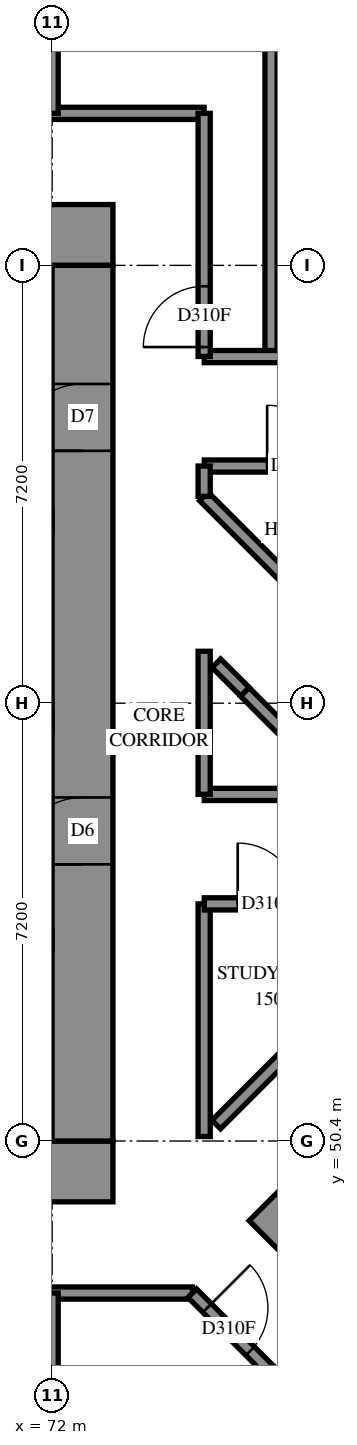
"""IFC4 building model, lengths in metres.
Left out: names, types, materials, properties, quantities, classifications, styles, units other than length and angle.
Written with IfcOpenShell. Run it as: python <this file> out.ifc"""

import sys

from ifc_helpers import new_model, si_unit, direction, frame, frame_2d, origin, place, context, subcontext, project, spatial, rectangle, extrude, element, fill, save


model = new_model("IFC4")
c1 = context("Model", 3, precision=1e-05, world=origin(), true_north=direction((0.0, 1.0)))
c2 = subcontext(c1, "Body", "Model", "MODEL_VIEW")
j1 = project(units=[si_unit("LENGTHUNIT", "METRE"), si_unit("PLANEANGLEUNIT", "RADIAN")], contexts=[c1])
p1 = place(None, origin())
s1 = spatial("IfcSite", under=j1, at=p1, CompositionType="ELEMENT")
p2 = place(p1, origin())
s2 = spatial("IfcBuilding", under=s1, at=p2, CompositionType="ELEMENT")
p3 = place(p2, frame((0.0, 0.0, 57.6)))
s3 = spatial("IfcBuildingStorey", under=s2, at=p3, CompositionType="ELEMENT", Elevation=57.6)
p4 = place(p3, frame((56.6, 49.9, -0.3), z_axis=(0.0, 0.0, 1.0), x_axis=(1.0, 0.0, 0.0)))
e1 = element("IfcWall", 1, at=p4, inside=s3, PredefinedType="SHEAR", context=c2, shape_type="SweptSolid", body=[
    extrude(rectangle(XDim=16.4, YDim=1.0, at=frame_2d((8.2, 0.0))), origin(), (0.0, 0.0, 1.0), 2.7),
])
p5 = place(p3, frame((56.6, 65.3, -0.3), z_axis=(0.0, 0.0, 1.0), x_axis=(1.0, 0.0, 0.0)))
e2 = element("IfcWall", 2, at=p5, inside=s3, PredefinedType="SHEAR", context=c2, shape_type="SweptSolid", body=[
    extrude(rectangle(XDim=16.4, YDim=1.0, at=frame_2d((8.2, 0.0))), origin(), (0.0, 0.0, 1.0), 2.7),
])
p6 = place(p5, frame((11.0, 0.0, 0.3)))
e3 = element("IfcOpeningElement", 3, at=p6, cuts=e2, PredefinedType="OPENING", context=c2, shape_type="SweptSolid", body=[
    extrude(rectangle(XDim=0.8, YDim=2.1, at=frame_2d((0.4, 1.05))), frame((0.0, 0.51, 0.0), z_axis=(0.0, -1.0, 0.0), x_axis=(1.0, 0.0, 0.0)), (0.0, 0.0, 1.0), 1.02),
])
p7 = place(p3, frame((72.5, 50.4, -0.3), z_axis=(0.0, 0.0, 1.0), x_axis=(0.0, 1.0, 0.0)))
e4 = element("IfcWall", 4, at=p7, inside=s3, PredefinedType="SHEAR", context=c2, shape_type="SweptSolid", body=[
    extrude(rectangle(XDim=14.4, YDim=1.0, at=frame_2d((7.2, 0.0))), origin(), (0.0, 0.0, 1.0), 2.7),
])
p8 = place(p7, frame((4.55, 0.0, 0.3)))
e5 = element("IfcOpeningElement", 5, at=p8, cuts=e4, PredefinedType="OPENING", context=c2, shape_type="SweptSolid", body=[
    extrude(rectangle(XDim=1.1, YDim=2.1, at=frame_2d((0.55, 1.05))), frame((0.0, 0.51, 0.0), z_axis=(0.0, -1.0, 0.0), x_axis=(1.0, 0.0, 0.0)), (0.0, 0.0, 1.0), 1.02),
])
p9 = place(p7, frame((11.35, 0.0, 0.3)))
e6 = element("IfcOpeningElement", 6, at=p9, cuts=e4, PredefinedType="OPENING", context=c2, shape_type="SweptSolid", body=[
    extrude(rectangle(XDim=1.1, YDim=2.1, at=frame_2d((0.55, 1.05))), frame((0.0, 0.51, 0.0), z_axis=(0.0, -1.0, 0.0), x_axis=(1.0, 0.0, 0.0)), (0.0, 0.0, 1.0), 1.02),
])
p10 = place(p3, frame((75.594, 49.443, -0.3), z_axis=(0.0, 0.0, 1.0), x_axis=(0.7071037324, -0.70710983, 0.0)))
e7 = element("IfcWall", 7, at=p10, inside=s3, PredefinedType="SHEAR", context=c2, shape_type="SweptSolid", body=[
    extrude(rectangle(XDim=16.4, YDim=1.0, at=frame_2d((8.2, 0.0))), origin(), (0.0, 0.0, 1.0), 2.7),
])
p11 = place(p3, frame((55.1, 67.3, 0.0), z_axis=(0.0, 0.0, 1.0), x_axis=(1.0, 0.0, 0.0)))
e8 = element("IfcWall", 8, at=p11, inside=s3, PredefinedType="PARTITIONING", context=c2, shape_type="SweptSolid", body=[
    extrude(rectangle(XDim=19.4, YDim=0.2, at=frame_2d((9.7, 0.0))), origin(), (0.0, 0.0, 1.0), 3.1),
])
p12 = place(p11, frame((6.361, 0.0, 0.0)))
e9 = element("IfcOpeningElement", 9, at=p12, cuts=e8, PredefinedType="OPENING", context=c2, shape_type="SweptSolid", body=[
    extrude(rectangle(XDim=0.9, YDim=2.1, at=frame_2d((0.45, 1.05))), frame((0.0, 0.11, 0.0), z_axis=(0.0, -1.0, 0.0), x_axis=(1.0, 0.0, 0.0)), (0.0, 0.0, 1.0), 0.22),
])
p13 = place(p11, frame((13.561, 0.0, 0.0)))
e10 = element("IfcOpeningElement", 10, at=p13, cuts=e8, PredefinedType="OPENING", context=c2, shape_type="SweptSolid", body=[
    extrude(rectangle(XDim=0.9, YDim=2.1, at=frame_2d((0.45, 1.05))), frame((0.0, 0.11, 0.0), z_axis=(0.0, -1.0, 0.0), x_axis=(1.0, 0.0, 0.0)), (0.0, 0.0, 1.0), 0.22),
])
p14 = place(p3, frame((55.1, 47.9, 0.0), z_axis=(0.0, 0.0, 1.0), x_axis=(1.0, 0.0, 0.0)))
e11 = element("IfcWall", 11, at=p14, inside=s3, PredefinedType="PARTITIONING", context=c2, shape_type="SweptSolid", body=[
    extrude(rectangle(XDim=19.208, YDim=0.2, at=frame_2d((9.604, 0.0))), origin(), (0.0, 0.0, 1.0), 3.1),
])
p15 = place(p14, frame((6.399, 0.0, 0.0)))
e12 = element("IfcOpeningElement", 12, at=p15, cuts=e11, PredefinedType="OPENING", context=c2, shape_type="SweptSolid", body=[
    extrude(rectangle(XDim=0.9, YDim=2.1, at=frame_2d((0.45, 1.05))), frame((0.0, 0.11, 0.0), z_axis=(0.0, -1.0, 0.0), x_axis=(1.0, 0.0, 0.0)), (0.0, 0.0, 1.0), 0.22),
])
p16 = place(p14, frame((13.561, 0.0, 0.0)))
e13 = element("IfcOpeningElement", 13, at=p16, cuts=e11, PredefinedType="OPENING", context=c2, shape_type="SweptSolid", body=[
    extrude(rectangle(XDim=0.9, YDim=2.1, at=frame_2d((0.45, 1.05))), frame((0.0, 0.11, 0.0), z_axis=(0.0, -1.0, 0.0), x_axis=(1.0, 0.0, 0.0)), (0.0, 0.0, 1.0), 0.22),
])
p17 = place(p3, frame((75.6, 63.3, 0.0), z_axis=(0.0, 0.0, 1.0), x_axis=(0.0, 1.0, 0.0)))
e14 = element("IfcWall", 14, at=p17, inside=s3, PredefinedType="PARTITIONING", context=c2, shape_type="SweptSolid", body=[
    extrude(rectangle(XDim=9.46, YDim=0.2, at=frame_2d((4.73, 0.0))), origin(), (0.0, 0.0, 1.0), 3.1),
])
p18 = place(p3, frame((74.699, 50.671, 0.0), z_axis=(0.0, 0.0, 1.0), x_axis=(0.7071067812, 0.7071067812, 0.0)))
e15 = element("IfcWall", 15, at=p18, inside=s3, PredefinedType="PARTITIONING", context=c2, shape_type="SweptSolid", body=[
    extrude(rectangle(XDim=5.131, YDim=0.2, at=frame_2d((2.565, 0.0))), origin(), (0.0, 0.0, 1.0), 3.1),
])
p19 = place(p3, frame((74.502, 63.3, 0.0), z_axis=(0.0, 0.0, 1.0), x_axis=(1.0, 0.0, 0.0)))
e16 = element("IfcWall", 16, at=p19, inside=s3, PredefinedType="PARTITIONING", context=c2, shape_type="SweptSolid", body=[
    extrude(rectangle(XDim=4.698, YDim=0.2, at=frame_2d((2.349, 0.0))), origin(), (0.0, 0.0, 1.0), 3.1),
])
p20 = place(p19, frame((1.963, 0.0, 0.0)))
e17 = element("IfcOpeningElement", 17, at=p20, cuts=e16, PredefinedType="OPENING", context=c2, shape_type="SweptSolid", body=[
    extrude(rectangle(XDim=1.0, YDim=2.1, at=frame_2d((0.5, 1.05))), frame((0.0, 0.11, 0.0), z_axis=(0.0, -1.0, 0.0), x_axis=(1.0, 0.0, 0.0)), (0.0, 0.0, 1.0), 0.22),
])
p21 = place(p3, frame((74.502, 61.5, 0.0), z_axis=(0.0, 0.0, 1.0), x_axis=(1.0, 0.0, 0.0)))
e18 = element("IfcWall", 18, at=p21, inside=s3, PredefinedType="PARTITIONING", context=c2, shape_type="SweptSolid", body=[
    extrude(rectangle(XDim=4.698, YDim=0.2, at=frame_2d((2.349, 0.0))), origin(), (0.0, 0.0, 1.0), 3.1),
])
p22 = place(p21, frame((1.034, 0.0, 0.0)))
e19 = element("IfcOpeningElement", 19, at=p22, cuts=e18, PredefinedType="OPENING", context=c2, shape_type="SweptSolid", body=[
    extrude(rectangle(XDim=1.0, YDim=2.1, at=frame_2d((0.5, 1.05))), frame((0.0, 0.11, 0.0), z_axis=(0.0, -1.0, 0.0), x_axis=(1.0, 0.0, 0.0)), (0.0, 0.0, 1.0), 0.22),
])
p23 = place(p3, frame((74.305, 47.897, 0.0), z_axis=(0.0, 0.0, 1.0), x_axis=(0.7071067812, -0.7071067812, 0.0)))
e20 = element("IfcWall", 20, at=p23, inside=s3, PredefinedType="PARTITIONING", context=c2, shape_type="SweptSolid", body=[
    extrude(rectangle(XDim=4.302, YDim=0.2, at=frame_2d((2.151, 0.0))), origin(), (0.0, 0.0, 1.0), 3.1),
])
p24 = place(p23, frame((0.345, 0.0, 0.0)))
e21 = element("IfcOpeningElement", 21, at=p24, cuts=e20, PredefinedType="OPENING", context=c2, shape_type="SweptSolid", body=[
    extrude(rectangle(XDim=1.0, YDim=2.1, at=frame_2d((0.5, 1.05))), frame((0.0, 0.11, 0.0), z_axis=(0.0, -1.0, 0.0), x_axis=(1.0, 0.0, 0.0)), (0.0, 0.0, 1.0), 0.22),
])
for number, where, z_axis, x_axis in (
    (22, (72.0, 67.3, 0.0), (0.0, 0.0, 1.0), (0.0, 1.0, 0.0)),
    (23, (72.0, 43.8, 0.0), (0.0, 0.0, 1.0), (0.0, 1.0, 0.0)),
):
    element("IfcWall", number, at=place(p3, frame(where, z_axis=z_axis, x_axis=x_axis)), inside=s3, PredefinedType="PARTITIONING", context=c2, shape_type="SweptSolid", body=[
        extrude(rectangle(XDim=4.1, YDim=0.2, at=frame_2d((2.05, 0.0))), origin(), (0.0, 0.0, 1.0), 3.1),
    ])
p25 = place(p3, frame((74.497, 60.999, 0.0), z_axis=(0.0, 0.0, 1.0), x_axis=(0.7071067812, -0.7071067812, 0.0)))
e24 = element("IfcWall", 24, at=p25, inside=s3, PredefinedType="PARTITIONING", context=c2, shape_type="SweptSolid", body=[
    extrude(rectangle(XDim=4.028, YDim=0.2, at=frame_2d((2.014, 0.0))), origin(), (0.0, 0.0, 1.0), 3.1),
])
p26 = place(p3, frame((74.5, 63.302, 0.0), z_axis=(0.0, 0.0, 1.0), x_axis=(0.0, 1.0, 0.0)))
e25 = element("IfcWall", 25, at=p26, inside=s3, PredefinedType="PARTITIONING", context=c2, shape_type="SweptSolid", body=[
    extrude(rectangle(XDim=3.998, YDim=0.2, at=frame_2d((1.999, 0.0))), origin(), (0.0, 0.0, 1.0), 3.1),
])
p27 = place(p26, frame((0.154, 0.0, 0.0)))
e26 = element("IfcOpeningElement", 26, at=p27, cuts=e25, PredefinedType="OPENING", context=c2, shape_type="SweptSolid", body=[
    extrude(rectangle(XDim=1.0, YDim=2.1, at=frame_2d((0.5, 1.05))), frame((0.0, 0.11, 0.0), z_axis=(0.0, -1.0, 0.0), x_axis=(1.0, 0.0, 0.0)), (0.0, 0.0, 1.0), 0.22),
])
p28 = place(p3, frame((74.5, 50.474, 0.0), z_axis=(0.0, 0.0, 1.0), x_axis=(0.0, 1.0, 0.0)))
e27 = element("IfcWall", 27, at=p28, inside=s3, PredefinedType="PARTITIONING", context=c2, shape_type="SweptSolid", body=[
    extrude(rectangle(XDim=3.826, YDim=0.2, at=frame_2d((1.913, 0.0))), origin(), (0.0, 0.0, 1.0), 3.1),
])
p29 = place(p3, frame((74.502, 54.3, 0.0), z_axis=(0.0, 0.0, 1.0), x_axis=(1.0, 0.0, 0.0)))
e28 = element("IfcWall", 28, at=p29, inside=s3, PredefinedType="PARTITIONING", context=c2, shape_type="SweptSolid", body=[
    extrude(rectangle(XDim=3.824, YDim=0.2, at=frame_2d((1.912, 0.0))), origin(), (0.0, 0.0, 1.0), 3.1),
])
p30 = place(p29, frame((0.55, 0.0, 0.0)))
e29 = element("IfcOpeningElement", 29, at=p30, cuts=e28, PredefinedType="OPENING", context=c2, shape_type="SweptSolid", body=[
    extrude(rectangle(XDim=1.0, YDim=2.1, at=frame_2d((0.5, 1.05))), frame((0.0, 0.11, 0.0), z_axis=(0.0, -1.0, 0.0), x_axis=(1.0, 0.0, 0.0)), (0.0, 0.0, 1.0), 0.22),
])
p31 = place(p3, frame((75.168, 57.786, 0.0), z_axis=(0.0, 0.0, 1.0), x_axis=(0.7066870088, -0.7075263045, 0.0)))
e30 = element("IfcWall", 30, at=p31, inside=s3, PredefinedType="PARTITIONING", context=c2, shape_type="SweptSolid", body=[
    extrude(rectangle(XDim=2.383, YDim=0.2, at=frame_2d((1.192, 0.0))), origin(), (0.0, 0.0, 1.0), 3.1),
])
for number, where, z_axis, x_axis in (
    (31, (74.502, 56.1, 0.0), (0.0, 0.0, 1.0), (1.0, 0.0, 0.0)),
    (32, (74.5, 56.102, 0.0), (0.0, 0.0, 1.0), (0.0, 1.0, 0.0)),
):
    element("IfcWall", number, at=place(p3, frame(where, z_axis=z_axis, x_axis=x_axis)), inside=s3, PredefinedType="PARTITIONING", context=c2, shape_type="SweptSolid", body=[
        extrude(rectangle(XDim=2.352, YDim=0.2, at=frame_2d((1.176, 0.0))), origin(), (0.0, 0.0, 1.0), 3.1),
    ])
p32 = place(p3, frame((74.701, 58.257, 0.0), z_axis=(0.0, 0.0, 1.0), x_axis=(0.7086128608, -0.7055974869, 0.0)))
e33 = element("IfcWall", 33, at=p32, inside=s3, PredefinedType="PARTITIONING", context=c2, shape_type="SweptSolid", body=[
    extrude(rectangle(XDim=0.663, YDim=0.2, at=frame_2d((0.332, 0.0))), origin(), (0.0, 0.0, 1.0), 3.1),
])
p33 = place(p3, frame((74.5, 61.002, 0.0), z_axis=(0.0, 0.0, 1.0), x_axis=(0.0, 1.0, 0.0)))
e34 = element("IfcWall", 34, at=p33, inside=s3, PredefinedType="PARTITIONING", context=c2, shape_type="SweptSolid", body=[
    extrude(rectangle(XDim=0.498, YDim=0.2, at=frame_2d((0.249, 0.0))), origin(), (0.0, 0.0, 1.0), 3.1),
])
p34 = place(p8, origin())
e35 = element("IfcDoor", 35, at=p34, inside=s3, OperationType="DOUBLE_DOOR_SINGLE_SWING", PredefinedType="DOOR", context=c2, shape_type="SweptSolid", body=[
    extrude(rectangle(XDim=1.1, YDim=2.1, at=frame_2d((0.55, 1.05))), frame((0.0, 0.025, 0.0), z_axis=(0.0, -1.0, 0.0), x_axis=(1.0, 0.0, 0.0)), (0.0, 0.0, 1.0), 0.05),
])
fill(e5, e35)
p35 = place(p9, origin())
e36 = element("IfcDoor", 36, at=p35, inside=s3, OperationType="SINGLE_SWING_RIGHT", PredefinedType="DOOR", context=c2, shape_type="SweptSolid", body=[
    extrude(rectangle(XDim=1.1, YDim=2.1, at=frame_2d((0.55, 1.05))), frame((0.0, 0.025, 0.0), z_axis=(0.0, -1.0, 0.0), x_axis=(1.0, 0.0, 0.0)), (0.0, 0.0, 1.0), 0.05),
])
fill(e6, e36)
p36 = place(p30, origin())
e37 = element("IfcDoor", 37, at=p36, inside=s3, OperationType="SINGLE_SWING_RIGHT", PredefinedType="DOOR", context=c2, shape_type="SweptSolid", body=[
    extrude(rectangle(XDim=1.0, YDim=2.1, at=frame_2d((0.5, 1.05))), frame((0.0, 0.025, 0.0), z_axis=(0.0, -1.0, 0.0), x_axis=(1.0, 0.0, 0.0)), (0.0, 0.0, 1.0), 0.05),
])
fill(e29, e37)
p37 = place(p27, origin())
e38 = element("IfcDoor", 38, at=p37, inside=s3, OperationType="SINGLE_SWING_RIGHT", PredefinedType="DOOR", context=c2, shape_type="SweptSolid", body=[
    extrude(rectangle(XDim=1.0, YDim=2.1, at=frame_2d((0.5, 1.05))), frame((0.0, 0.025, 0.0), z_axis=(0.0, -1.0, 0.0), x_axis=(1.0, 0.0, 0.0)), (0.0, 0.0, 1.0), 0.05),
])
fill(e26, e38)
p38 = place(p24, origin())
e39 = element("IfcDoor", 39, at=p38, inside=s3, OperationType="SINGLE_SWING_LEFT", PredefinedType="DOOR", context=c2, shape_type="SweptSolid", body=[
    extrude(rectangle(XDim=1.0, YDim=2.1, at=frame_2d((0.5, 1.05))), frame((0.0, 0.025, 0.0), z_axis=(0.0, -1.0, 0.0), x_axis=(1.0, 0.0, 0.0)), (0.0, 0.0, 1.0), 0.05),
])
fill(e21, e39)
p39 = place(p22, origin())
e40 = element("IfcDoor", 40, at=p39, inside=s3, OperationType="SINGLE_SWING_RIGHT", PredefinedType="DOOR", context=c2, shape_type="SweptSolid", body=[
    extrude(rectangle(XDim=1.0, YDim=2.1, at=frame_2d((0.5, 1.05))), frame((0.0, 0.025, 0.0), z_axis=(0.0, -1.0, 0.0), x_axis=(1.0, 0.0, 0.0)), (0.0, 0.0, 1.0), 0.05),
])
fill(e19, e40)
save(model, sys.argv[1])
